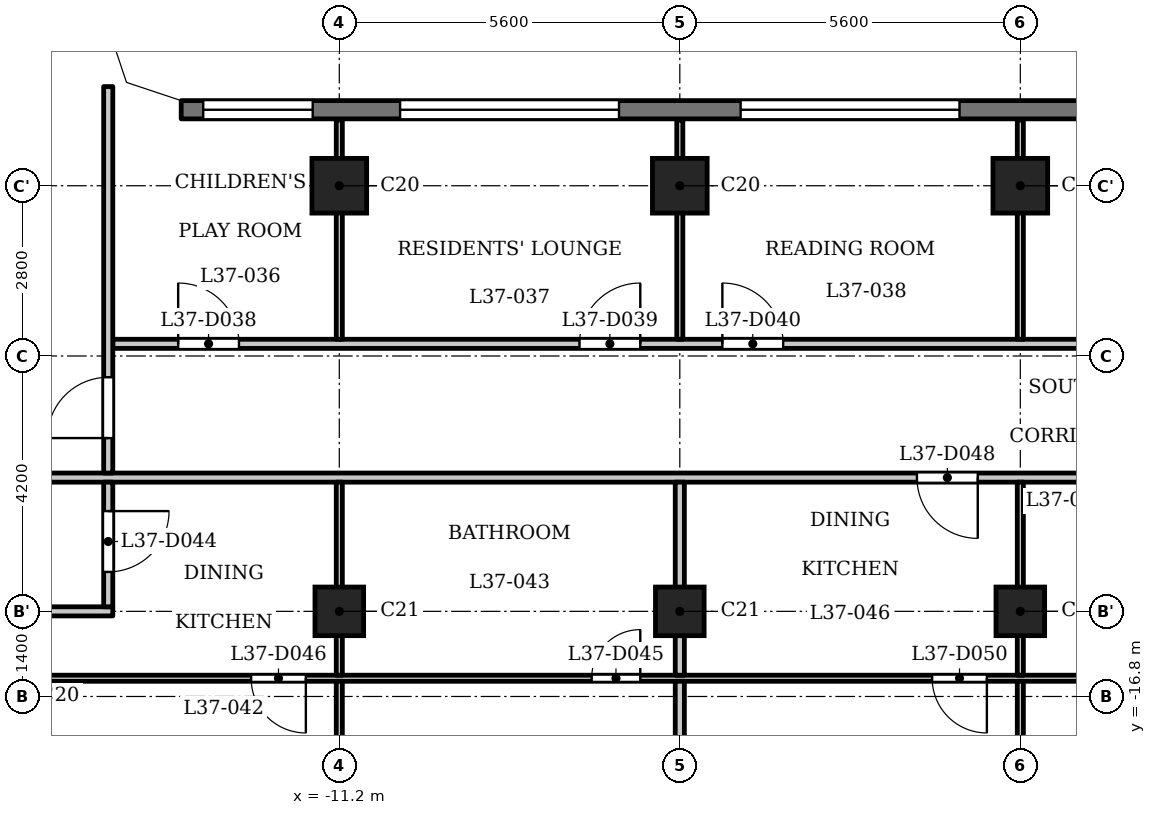
"""IFC4 building model, lengths in metres.
Left out: names, types, materials, properties, quantities, classifications, styles, units other than length and angle.
Written with IfcOpenShell. Run it as: python <this file> out.ifc"""

import sys

from ifc_helpers import new_model, si_unit, direction, frame, frame_2d, origin, origin_2d, place, context, subcontext, project, spatial, polyline, rectangle, outline, extrude, element, fill, save


model = new_model("IFC4")
c1 = context("Model", 3, precision=1e-05, world=origin(), true_north=direction((0.0, 1.0)))
c2 = subcontext(c1, "Body", "Model", "MODEL_VIEW")
j1 = project(units=[si_unit("LENGTHUNIT", "METRE"), si_unit("PLANEANGLEUNIT", "RADIAN")], contexts=[c1])
p1 = place(None, origin())
s1 = spatial("IfcSite", under=j1, at=p1, CompositionType="ELEMENT")
p2 = place(p1, origin())
s2 = spatial("IfcBuilding", under=s1, at=p2, CompositionType="ELEMENT")
p3 = place(p2, frame((0.0, 0.0, 146.6)))
s3 = spatial("IfcBuildingStorey", under=s2, at=p3, CompositionType="ELEMENT", Elevation=146.6)
for number, where, z_axis, x_axis in (
    (1, (-11.2, -8.4, 0.0), (0.0, 0.0, 1.0), (1.0, 0.0, 0.0)),
    (2, (-5.6, -8.4, 0.0), (0.0, 0.0, 1.0), (1.0, 0.0, 0.0)),
    (3, (0.0, -8.4, 0.0), (0.0, 0.0, 1.0), (1.0, 0.0, 0.0)),
):
    element("IfcColumn", number, at=place(p3, frame(where, z_axis=z_axis, x_axis=x_axis)), inside=s3, PredefinedType="COLUMN", context=c2, shape_type="SweptSolid", body=[
        extrude(rectangle(XDim=0.9, YDim=0.9, at=origin_2d()), origin(), (0.0, 0.0, 1.0), 3.5),
    ])
for number, where, z_axis, x_axis in (
    (4, (-11.2, -15.4, 0.0), (0.0, 0.0, 1.0), (1.0, 0.0, 0.0)),
    (5, (-5.6, -15.4, 0.0), (0.0, 0.0, 1.0), (1.0, 0.0, 0.0)),
    (6, (0.0, -15.4, 0.0), (0.0, 0.0, 1.0), (1.0, 0.0, 0.0)),
):
    element("IfcColumn", number, at=place(p3, frame(where, z_axis=z_axis, x_axis=x_axis)), inside=s3, PredefinedType="COLUMN", context=c2, shape_type="SweptSolid", body=[
        extrude(rectangle(XDim=0.8, YDim=0.8, at=origin_2d()), origin(), (0.0, 0.0, 1.0), 3.5),
    ])
p4 = place(p3, frame((13.8, -7.15, 0.0), z_axis=(0.0, 0.0, 1.0), x_axis=(-1.0, 0.0, 0.0)))
e7 = element("IfcWall", 7, at=p4, inside=s3, PredefinedType="SOLIDWALL", context=c2, shape_type="SweptSolid", body=[
    extrude(rectangle(XDim=27.6, YDim=0.3, at=frame_2d((13.8, 0.0))), origin(), (0.0, 0.0, 1.0), 3.2),
])
p5 = place(p4, frame((0.363, 0.0, 0.9)))
e8 = element("IfcOpeningElement", 8, at=p5, cuts=e7, PredefinedType="OPENING", context=c2, shape_type="SweptSolid", body=[
    extrude(rectangle(XDim=1.8, YDim=1.25, at=frame_2d((0.9, 0.625))), frame((0.0, 0.16, 0.0), z_axis=(0.0, -1.0, 0.0), x_axis=(1.0, 0.0, 0.0)), (0.0, 0.0, 1.0), 0.32),
])
p6 = place(p4, frame((3.6, 0.0, 1.2)))
e9 = element("IfcOpeningElement", 9, at=p6, cuts=e7, PredefinedType="OPENING", context=c2, shape_type="SweptSolid", body=[
    extrude(rectangle(XDim=3.6, YDim=0.95, at=frame_2d((1.8, 0.475))), frame((0.0, 0.16, 0.0), z_axis=(0.0, -1.0, 0.0), x_axis=(1.0, 0.0, 0.0)), (0.0, 0.0, 1.0), 0.32),
])
p7 = place(p4, frame((9.2, 0.0, 1.2)))
e10 = element("IfcOpeningElement", 10, at=p7, cuts=e7, PredefinedType="OPENING", context=c2, shape_type="SweptSolid", body=[
    extrude(rectangle(XDim=3.6, YDim=0.95, at=frame_2d((1.8, 0.475))), frame((0.0, 0.16, 0.0), z_axis=(0.0, -1.0, 0.0), x_axis=(1.0, 0.0, 0.0)), (0.0, 0.0, 1.0), 0.32),
])
p8 = place(p4, frame((14.8, 0.0, 1.2)))
e11 = element("IfcOpeningElement", 11, at=p8, cuts=e7, PredefinedType="OPENING", context=c2, shape_type="SweptSolid", body=[
    extrude(rectangle(XDim=3.6, YDim=0.95, at=frame_2d((1.8, 0.475))), frame((0.0, 0.16, 0.0), z_axis=(0.0, -1.0, 0.0), x_axis=(1.0, 0.0, 0.0)), (0.0, 0.0, 1.0), 0.32),
])
p9 = place(p4, frame((20.4, 0.0, 1.2)))
e12 = element("IfcOpeningElement", 12, at=p9, cuts=e7, PredefinedType="OPENING", context=c2, shape_type="SweptSolid", body=[
    extrude(rectangle(XDim=3.6, YDim=0.95, at=frame_2d((1.8, 0.475))), frame((0.0, 0.16, 0.0), z_axis=(0.0, -1.0, 0.0), x_axis=(1.0, 0.0, 0.0)), (0.0, 0.0, 1.0), 0.32),
])
p10 = place(p4, frame((25.438, 0.0, 0.9)))
e13 = element("IfcOpeningElement", 13, at=p10, cuts=e7, PredefinedType="OPENING", context=c2, shape_type="SweptSolid", body=[
    extrude(rectangle(XDim=1.8, YDim=1.25, at=frame_2d((0.9, 0.625))), frame((0.0, 0.16, 0.0), z_axis=(0.0, -1.0, 0.0), x_axis=(1.0, 0.0, 0.0)), (0.0, 0.0, 1.0), 0.32),
])
p11 = place(p3, frame((-16.725, -16.5, 0.0), z_axis=(0.0, 0.0, 1.0), x_axis=(1.0, 0.0, 0.0)))
e14 = element("IfcWall", 14, at=p11, inside=s3, PredefinedType="PARTITIONING", context=c2, shape_type="SweptSolid", body=[
    extrude(rectangle(XDim=33.45, YDim=0.1, at=frame_2d((16.725, 0.0))), origin(), (0.0, 0.0, 1.0), 3.2),
])
p12 = place(p11, frame((9.675, 0.0, 0.0)))
e15 = element("IfcOpeningElement", 15, at=p12, cuts=e14, PredefinedType="OPENING", context=c2, shape_type="SweptSolid", body=[
    extrude(rectangle(XDim=0.8, YDim=2.1, at=frame_2d((0.4, 1.05))), frame((0.0, 0.06, 0.0), z_axis=(0.0, -1.0, 0.0), x_axis=(1.0, 0.0, 0.0)), (0.0, 0.0, 1.0), 0.12),
])
p13 = place(p11, frame((4.075, 0.0, 0.0)))
e16 = element("IfcOpeningElement", 16, at=p13, cuts=e14, PredefinedType="OPENING", context=c2, shape_type="SweptSolid", body=[
    extrude(rectangle(XDim=0.9, YDim=2.1, at=frame_2d((0.45, 1.05))), frame((0.0, 0.06, 0.0), z_axis=(0.0, -1.0, 0.0), x_axis=(1.0, 0.0, 0.0)), (0.0, 0.0, 1.0), 0.12),
])
p14 = place(p11, frame((20.875, 0.0, 0.0)))
e17 = element("IfcOpeningElement", 17, at=p14, cuts=e14, PredefinedType="OPENING", context=c2, shape_type="SweptSolid", body=[
    extrude(rectangle(XDim=0.8, YDim=2.1, at=frame_2d((0.4, 1.05))), frame((0.0, 0.06, 0.0), z_axis=(0.0, -1.0, 0.0), x_axis=(1.0, 0.0, 0.0)), (0.0, 0.0, 1.0), 0.12),
])
p15 = place(p11, frame((15.275, 0.0, 0.0)))
e18 = element("IfcOpeningElement", 18, at=p15, cuts=e14, PredefinedType="OPENING", context=c2, shape_type="SweptSolid", body=[
    extrude(rectangle(XDim=0.9, YDim=2.1, at=frame_2d((0.45, 1.05))), frame((0.0, 0.06, 0.0), z_axis=(0.0, -1.0, 0.0), x_axis=(1.0, 0.0, 0.0)), (0.0, 0.0, 1.0), 0.12),
])
p16 = place(p11, frame((26.475, 0.0, 0.0)))
e19 = element("IfcOpeningElement", 19, at=p16, cuts=e14, PredefinedType="OPENING", context=c2, shape_type="SweptSolid", body=[
    extrude(rectangle(XDim=0.8, YDim=2.1, at=frame_2d((0.4, 1.05))), frame((0.0, 0.06, 0.0), z_axis=(0.0, -1.0, 0.0), x_axis=(1.0, 0.0, 0.0)), (0.0, 0.0, 1.0), 0.12),
])
p17 = place(p11, frame((30.575, 0.0, 0.0)))
e20 = element("IfcOpeningElement", 20, at=p17, cuts=e14, PredefinedType="OPENING", context=c2, shape_type="SweptSolid", body=[
    extrude(rectangle(XDim=0.9, YDim=2.1, at=frame_2d((0.45, 1.05))), frame((0.0, 0.06, 0.0), z_axis=(0.0, -1.0, 0.0), x_axis=(1.0, 0.0, 0.0)), (0.0, 0.0, 1.0), 0.12),
])
p18 = place(p3, frame((-27.484, -15.4, 0.0), z_axis=(0.0, 0.0, 1.0), x_axis=(1.0, 0.0, 0.0)))
e21 = element("IfcWall", 21, at=p18, inside=s3, PredefinedType="PARTITIONING", context=c2, shape_type="SweptSolid", body=[
    extrude(rectangle(XDim=12.559, YDim=0.15, at=frame_2d((6.279, 0.0))), origin(), (0.0, 0.0, 1.0), 3.2),
])
p19 = place(p18, frame((8.984, 0.0, 0.0)))
e22 = element("IfcOpeningElement", 22, at=p19, cuts=e21, PredefinedType="OPENING", context=c2, shape_type="SweptSolid", body=[
    extrude(rectangle(XDim=1.0, YDim=2.1, at=frame_2d((0.5, 1.05))), frame((0.0, 0.085, 0.0), z_axis=(0.0, -1.0, 0.0), x_axis=(1.0, 0.0, 0.0)), (0.0, 0.0, 1.0), 0.17),
])
p20 = place(p3, frame((-17.4, -13.2, 0.0), z_axis=(0.0, 0.0, 1.0), x_axis=(1.0, 0.0, 0.0)))
e23 = element("IfcWall", 23, at=p20, inside=s3, PredefinedType="PARTITIONING", context=c2, shape_type="SweptSolid", body=[
    extrude(rectangle(XDim=34.8, YDim=0.15, at=frame_2d((17.4, 0.0))), origin(), (0.0, 0.0, 1.0), 3.2),
])
p21 = place(p20, frame((0.15, 0.0, 0.0)))
e24 = element("IfcOpeningElement", 24, at=p21, cuts=e23, PredefinedType="OPENING", context=c2, shape_type="SweptSolid", body=[
    extrude(rectangle(XDim=1.0, YDim=2.1, at=frame_2d((0.5, 1.05))), frame((0.0, 0.085, 0.0), z_axis=(0.0, -1.0, 0.0), x_axis=(1.0, 0.0, 0.0)), (0.0, 0.0, 1.0), 0.17),
])
p22 = place(p20, frame((33.55, 0.0, 0.0)))
e25 = element("IfcOpeningElement", 25, at=p22, cuts=e23, PredefinedType="OPENING", context=c2, shape_type="SweptSolid", body=[
    extrude(rectangle(XDim=1.0, YDim=2.1, at=frame_2d((0.5, 1.05))), frame((0.0, 0.085, 0.0), z_axis=(0.0, -1.0, 0.0), x_axis=(1.0, 0.0, 0.0)), (0.0, 0.0, 1.0), 0.17),
])
p23 = place(p20, frame((15.7, 0.0, 0.0)))
e26 = element("IfcOpeningElement", 26, at=p23, cuts=e23, PredefinedType="OPENING", context=c2, shape_type="SweptSolid", body=[
    extrude(rectangle(XDim=1.0, YDim=2.1, at=frame_2d((0.5, 1.05))), frame((0.0, 0.085, 0.0), z_axis=(0.0, -1.0, 0.0), x_axis=(1.0, 0.0, 0.0)), (0.0, 0.0, 1.0), 0.17),
])
p24 = place(p3, frame((-14.925, -11.0, 0.0), z_axis=(0.0, 0.0, 1.0), x_axis=(1.0, 0.0, 0.0)))
e27 = element("IfcWall", 27, at=p24, inside=s3, PredefinedType="PARTITIONING", context=c2, shape_type="SweptSolid", body=[
    extrude(rectangle(XDim=29.85, YDim=0.15, at=frame_2d((14.925, 0.0))), origin(), (0.0, 0.0, 1.0), 3.2),
])
p25 = place(p24, frame((1.075, 0.0, 0.0)))
e28 = element("IfcOpeningElement", 28, at=p25, cuts=e27, PredefinedType="OPENING", context=c2, shape_type="SweptSolid", body=[
    extrude(rectangle(XDim=1.0, YDim=2.1, at=frame_2d((0.5, 1.05))), frame((0.0, 0.085, 0.0), z_axis=(0.0, -1.0, 0.0), x_axis=(1.0, 0.0, 0.0)), (0.0, 0.0, 1.0), 0.17),
])
p26 = place(p24, frame((7.675, 0.0, 0.0)))
e29 = element("IfcOpeningElement", 29, at=p26, cuts=e27, PredefinedType="OPENING", context=c2, shape_type="SweptSolid", body=[
    extrude(rectangle(XDim=1.0, YDim=2.1, at=frame_2d((0.5, 1.05))), frame((0.0, 0.085, 0.0), z_axis=(0.0, -1.0, 0.0), x_axis=(1.0, 0.0, 0.0)), (0.0, 0.0, 1.0), 0.17),
])
p27 = place(p24, frame((10.025, 0.0, 0.0)))
e30 = element("IfcOpeningElement", 30, at=p27, cuts=e27, PredefinedType="OPENING", context=c2, shape_type="SweptSolid", body=[
    extrude(rectangle(XDim=1.0, YDim=2.1, at=frame_2d((0.5, 1.05))), frame((0.0, 0.085, 0.0), z_axis=(0.0, -1.0, 0.0), x_axis=(1.0, 0.0, 0.0)), (0.0, 0.0, 1.0), 0.17),
])
p28 = place(p24, frame((18.875, 0.0, 0.0)))
e31 = element("IfcOpeningElement", 31, at=p28, cuts=e27, PredefinedType="OPENING", context=c2, shape_type="SweptSolid", body=[
    extrude(rectangle(XDim=1.0, YDim=2.1, at=frame_2d((0.5, 1.05))), frame((0.0, 0.085, 0.0), z_axis=(0.0, -1.0, 0.0), x_axis=(1.0, 0.0, 0.0)), (0.0, 0.0, 1.0), 0.17),
])
p29 = place(p24, frame((21.225, 0.0, 0.0)))
e32 = element("IfcOpeningElement", 32, at=p29, cuts=e27, PredefinedType="OPENING", context=c2, shape_type="SweptSolid", body=[
    extrude(rectangle(XDim=1.0, YDim=2.1, at=frame_2d((0.5, 1.05))), frame((0.0, 0.085, 0.0), z_axis=(0.0, -1.0, 0.0), x_axis=(1.0, 0.0, 0.0)), (0.0, 0.0, 1.0), 0.17),
])
p30 = place(p24, frame((27.774, 0.0, 0.0)))
e33 = element("IfcOpeningElement", 33, at=p30, cuts=e27, PredefinedType="OPENING", context=c2, shape_type="SweptSolid", body=[
    extrude(rectangle(XDim=1.0, YDim=2.1, at=frame_2d((0.5, 1.05))), frame((0.0, 0.085, 0.0), z_axis=(0.0, -1.0, 0.0), x_axis=(1.0, 0.0, 0.0)), (0.0, 0.0, 1.0), 0.17),
])
p31 = place(p3, frame((-15.0, -15.325, 0.0), z_axis=(0.0, 0.0, 1.0), x_axis=(0.0, 1.0, 0.0)))
e34 = element("IfcWall", 34, at=p31, inside=s3, PredefinedType="PARTITIONING", context=c2, shape_type="SweptSolid", body=[
    extrude(rectangle(XDim=2.05, YDim=0.15, at=frame_2d((1.025, 0.0))), origin(), (0.0, 0.0, 1.0), 3.2),
])
p32 = place(p31, frame((0.574, 0.0, 0.0)))
e35 = element("IfcOpeningElement", 35, at=p32, cuts=e34, PredefinedType="OPENING", context=c2, shape_type="SweptSolid", body=[
    extrude(rectangle(XDim=1.0, YDim=2.1, at=frame_2d((0.5, 1.05))), frame((0.0, 0.085, 0.0), z_axis=(0.0, -1.0, 0.0), x_axis=(1.0, 0.0, 0.0)), (0.0, 0.0, 1.0), 0.17),
])
p33 = place(p3, frame((-15.0, -13.125, 0.0), z_axis=(0.0, 0.0, 1.0), x_axis=(0.0, 1.0, 0.0)))
e36 = element("IfcWall", 36, at=p33, inside=s3, PredefinedType="PARTITIONING", context=c2, shape_type="SweptSolid", body=[
    extrude(rectangle(XDim=6.356, YDim=0.15, at=frame_2d((3.178, 0.0))), origin(), (0.0, 0.0, 1.0), 3.2),
])
p34 = place(p33, frame((0.575, 0.0, 0.0)))
e37 = element("IfcOpeningElement", 37, at=p34, cuts=e36, PredefinedType="OPENING", context=c2, shape_type="SweptSolid", body=[
    extrude(rectangle(XDim=1.0, YDim=2.1, at=frame_2d((0.5, 1.05))), frame((0.0, 0.085, 0.0), z_axis=(0.0, -1.0, 0.0), x_axis=(1.0, 0.0, 0.0)), (0.0, 0.0, 1.0), 0.17),
])
p35 = place(p3, frame((-11.2, -22.93, 0.0), z_axis=(0.0, 0.0, 1.0), x_axis=(0.0, 1.0, 0.0)))
e38 = element("IfcWall", 38, at=p35, inside=s3, PredefinedType="PARTITIONING", context=c2, shape_type="SweptSolid", body=[
    extrude(rectangle(XDim=6.38, YDim=0.1, at=frame_2d((3.19, 0.0))), origin(), (0.0, 0.0, 1.0), 3.2),
])
p36 = place(p35, frame((1.27, 0.0, 0.0)))
e39 = element("IfcOpeningElement", 39, at=p36, cuts=e38, PredefinedType="OPENING", context=c2, shape_type="SweptSolid", body=[
    extrude(rectangle(XDim=0.9, YDim=2.1, at=frame_2d((0.45, 1.05))), frame((0.0, 0.06, 0.0), z_axis=(0.0, -1.0, 0.0), x_axis=(1.0, 0.0, 0.0)), (0.0, 0.0, 1.0), 0.12),
])
p37 = place(p3, frame((-11.2, -16.45, 0.0), z_axis=(0.0, 0.0, 1.0), x_axis=(0.0, 1.0, 0.0)))
e40 = element("IfcWall", 40, at=p37, inside=s3, PredefinedType="PARTITIONING", context=c2, shape_type="SweptSolid", body=[
    extrude(rectangle(XDim=3.175, YDim=0.1, at=frame_2d((1.587, 0.0))), origin(), (0.0, 0.0, 1.0), 3.2),
])
for number, where, z_axis, x_axis in (
    (41, (-11.2, -10.925, 0.0), (0.0, 0.0, 1.0), (0.0, 1.0, 0.0)),
    (42, (-5.6, -10.925, 0.0), (0.0, 0.0, 1.0), (0.0, 1.0, 0.0)),
):
    element("IfcWall", number, at=place(p3, frame(where, z_axis=z_axis, x_axis=x_axis)), inside=s3, PredefinedType="PARTITIONING", context=c2, shape_type="SweptSolid", body=[
        extrude(rectangle(XDim=3.605, YDim=0.1, at=frame_2d((1.802, 0.0))), origin(), (0.0, 0.0, 1.0), 3.2),
    ])
p38 = place(p3, frame((-5.6, -22.93, 0.0), z_axis=(0.0, 0.0, 1.0), x_axis=(0.0, 1.0, 0.0)))
e43 = element("IfcWall", 43, at=p38, inside=s3, PredefinedType="PARTITIONING", context=c2, shape_type="SweptSolid", body=[
    extrude(rectangle(XDim=6.38, YDim=0.15, at=frame_2d((3.19, 0.0))), origin(), (0.0, 0.0, 1.0), 3.2),
])
p39 = place(p3, frame((-5.6, -16.45, 0.0), z_axis=(0.0, 0.0, 1.0), x_axis=(0.0, 1.0, 0.0)))
e44 = element("IfcWall", 44, at=p39, inside=s3, PredefinedType="PARTITIONING", context=c2, shape_type="SweptSolid", body=[
    extrude(rectangle(XDim=3.175, YDim=0.15, at=frame_2d((1.587, 0.0))), origin(), (0.0, 0.0, 1.0), 3.2),
])
p40 = place(p3, frame((0.0, -22.93, 0.0), z_axis=(0.0, 0.0, 1.0), x_axis=(0.0, 1.0, 0.0)))
e45 = element("IfcWall", 45, at=p40, inside=s3, PredefinedType="PARTITIONING", context=c2, shape_type="SweptSolid", body=[
    extrude(rectangle(XDim=6.38, YDim=0.1, at=frame_2d((3.19, 0.0))), origin(), (0.0, 0.0, 1.0), 3.2),
])
p41 = place(p40, frame((1.27, 0.0, 0.0)))
e46 = element("IfcOpeningElement", 46, at=p41, cuts=e45, PredefinedType="OPENING", context=c2, shape_type="SweptSolid", body=[
    extrude(rectangle(XDim=0.9, YDim=2.1, at=frame_2d((0.45, 1.05))), frame((0.0, 0.06, 0.0), z_axis=(0.0, -1.0, 0.0), x_axis=(1.0, 0.0, 0.0)), (0.0, 0.0, 1.0), 0.12),
])
p42 = place(p3, frame((0.0, -16.45, 0.0), z_axis=(0.0, 0.0, 1.0), x_axis=(0.0, 1.0, 0.0)))
e47 = element("IfcWall", 47, at=p42, inside=s3, PredefinedType="PARTITIONING", context=c2, shape_type="SweptSolid", body=[
    extrude(rectangle(XDim=3.175, YDim=0.1, at=frame_2d((1.587, 0.0))), origin(), (0.0, 0.0, 1.0), 3.2),
])
p43 = place(p3, frame((0.0, -10.925, 0.0), z_axis=(0.0, 0.0, 1.0), x_axis=(0.0, 1.0, 0.0)))
e48 = element("IfcWall", 48, at=p43, inside=s3, PredefinedType="PARTITIONING", context=c2, shape_type="SweptSolid", body=[
    extrude(rectangle(XDim=3.605, YDim=0.1, at=frame_2d((1.802, 0.0))), origin(), (0.0, 0.0, 1.0), 3.2),
])
p44 = place(p3, origin())
e49 = element("IfcWall", 49, at=p44, inside=s3, PredefinedType="SOLIDWALL", context=c2, shape_type="SweptSolid", body=[
    extrude(outline(polyline([(-14.937, -6.937), (-13.849, -7.3), (-13.8, -7.3), (-13.8, -7.0), (-14.7, -6.7), (-15.0, -5.8), (-15.3, -5.8), (-15.3, -5.849), (-14.937, -6.937)])), origin(), (0.0, 0.0, 1.0), 3.2),
])
p45 = place(p34, origin())
e50 = element("IfcDoor", 50, at=p45, inside=s3, OperationType="SINGLE_SWING_RIGHT", PredefinedType="DOOR", context=c2, shape_type="SweptSolid", body=[
    extrude(rectangle(XDim=1.0, YDim=2.1, at=frame_2d((0.5, 1.05))), frame((0.0, 0.025, 0.0), z_axis=(0.0, -1.0, 0.0), x_axis=(1.0, 0.0, 0.0)), (0.0, 0.0, 1.0), 0.05),
])
fill(e37, e50)
p46 = place(p25, origin())
e51 = element("IfcDoor", 51, at=p46, inside=s3, OperationType="SINGLE_SWING_RIGHT", PredefinedType="DOOR", context=c2, shape_type="SweptSolid", body=[
    extrude(rectangle(XDim=1.0, YDim=2.1, at=frame_2d((0.5, 1.05))), frame((0.0, 0.025, 0.0), z_axis=(0.0, -1.0, 0.0), x_axis=(1.0, 0.0, 0.0)), (0.0, 0.0, 1.0), 0.05),
])
fill(e28, e51)
p47 = place(p26, origin())
e52 = element("IfcDoor", 52, at=p47, inside=s3, OperationType="SINGLE_SWING_LEFT", PredefinedType="DOOR", context=c2, shape_type="SweptSolid", body=[
    extrude(rectangle(XDim=1.0, YDim=2.1, at=frame_2d((0.5, 1.05))), frame((0.0, 0.025, 0.0), z_axis=(0.0, -1.0, 0.0), x_axis=(1.0, 0.0, 0.0)), (0.0, 0.0, 1.0), 0.05),
])
fill(e29, e52)
p48 = place(p27, origin())
e53 = element("IfcDoor", 53, at=p48, inside=s3, OperationType="SINGLE_SWING_RIGHT", PredefinedType="DOOR", context=c2, shape_type="SweptSolid", body=[
    extrude(rectangle(XDim=1.0, YDim=2.1, at=frame_2d((0.5, 1.05))), frame((0.0, 0.025, 0.0), z_axis=(0.0, -1.0, 0.0), x_axis=(1.0, 0.0, 0.0)), (0.0, 0.0, 1.0), 0.05),
])
fill(e30, e53)
p49 = place(p32, origin())
e54 = element("IfcDoor", 54, at=p49, inside=s3, OperationType="SINGLE_SWING_RIGHT", PredefinedType="DOOR", context=c2, shape_type="SweptSolid", body=[
    extrude(rectangle(XDim=1.0, YDim=2.1, at=frame_2d((0.5, 1.05))), frame((0.0, 0.025, 0.0), z_axis=(0.0, -1.0, 0.0), x_axis=(1.0, 0.0, 0.0)), (0.0, 0.0, 1.0), 0.05),
])
fill(e35, e54)
p50 = place(p12, origin())
e55 = element("IfcDoor", 55, at=p50, inside=s3, OperationType="SINGLE_SWING_LEFT", PredefinedType="DOOR", context=c2, shape_type="SweptSolid", body=[
    extrude(rectangle(XDim=0.8, YDim=2.1, at=frame_2d((0.4, 1.05))), frame((0.0, 0.025, 0.0), z_axis=(0.0, -1.0, 0.0), x_axis=(1.0, 0.0, 0.0)), (0.0, 0.0, 1.0), 0.05),
])
fill(e15, e55)
p51 = place(p13, origin())
e56 = element("IfcDoor", 56, at=p51, inside=s3, OperationType="SINGLE_SWING_RIGHT", PredefinedType="DOOR", context=c2, shape_type="SweptSolid", body=[
    extrude(rectangle(XDim=0.9, YDim=2.1, at=frame_2d((0.45, 1.05))), frame((0.0, 0.025, 0.0), z_axis=(0.0, -1.0, 0.0), x_axis=(1.0, 0.0, 0.0)), (0.0, 0.0, 1.0), 0.05),
])
fill(e16, e56)
p52 = place(p23, origin())
e57 = element("IfcDoor", 57, at=p52, inside=s3, OperationType="SINGLE_SWING_RIGHT", PredefinedType="DOOR", context=c2, shape_type="SweptSolid", body=[
    extrude(rectangle(XDim=1.0, YDim=2.1, at=frame_2d((0.5, 1.05))), frame((0.0, 0.025, 0.0), z_axis=(0.0, -1.0, 0.0), x_axis=(1.0, 0.0, 0.0)), (0.0, 0.0, 1.0), 0.05),
])
fill(e26, e57)
p53 = place(p15, origin())
e58 = element("IfcDoor", 58, at=p53, inside=s3, OperationType="SINGLE_SWING_RIGHT", PredefinedType="DOOR", context=c2, shape_type="SweptSolid", body=[
    extrude(rectangle(XDim=0.9, YDim=2.1, at=frame_2d((0.45, 1.05))), frame((0.0, 0.025, 0.0), z_axis=(0.0, -1.0, 0.0), x_axis=(1.0, 0.0, 0.0)), (0.0, 0.0, 1.0), 0.05),
])
fill(e18, e58)
p54 = place(p8, origin())
e59 = element("IfcWindow", 59, at=p54, inside=s3, PartitioningType="SINGLE_PANEL", PredefinedType="WINDOW", context=c2, shape_type="SweptSolid", body=[
    extrude(rectangle(XDim=3.6, YDim=0.95, at=frame_2d((1.8, 0.475))), frame((0.0, 0.03, 0.0), z_axis=(0.0, -1.0, 0.0), x_axis=(1.0, 0.0, 0.0)), (0.0, 0.0, 1.0), 0.06),
])
fill(e11, e59)
p55 = place(p9, origin())
e60 = element("IfcWindow", 60, at=p55, inside=s3, PartitioningType="SINGLE_PANEL", PredefinedType="WINDOW", context=c2, shape_type="SweptSolid", body=[
    extrude(rectangle(XDim=3.6, YDim=0.95, at=frame_2d((1.8, 0.475))), frame((0.0, 0.03, 0.0), z_axis=(0.0, -1.0, 0.0), x_axis=(1.0, 0.0, 0.0)), (0.0, 0.0, 1.0), 0.06),
])
fill(e12, e60)
p56 = place(p10, origin())
e61 = element("IfcWindow", 61, at=p56, inside=s3, PartitioningType="SINGLE_PANEL", PredefinedType="WINDOW", context=c2, shape_type="SweptSolid", body=[
    extrude(rectangle(XDim=1.8, YDim=1.25, at=frame_2d((0.9, 0.625))), frame((0.0, 0.03, 0.0), z_axis=(0.0, -1.0, 0.0), x_axis=(1.0, 0.0, 0.0)), (0.0, 0.0, 1.0), 0.06),
])
fill(e13, e61)
save(model, sys.argv[1])
